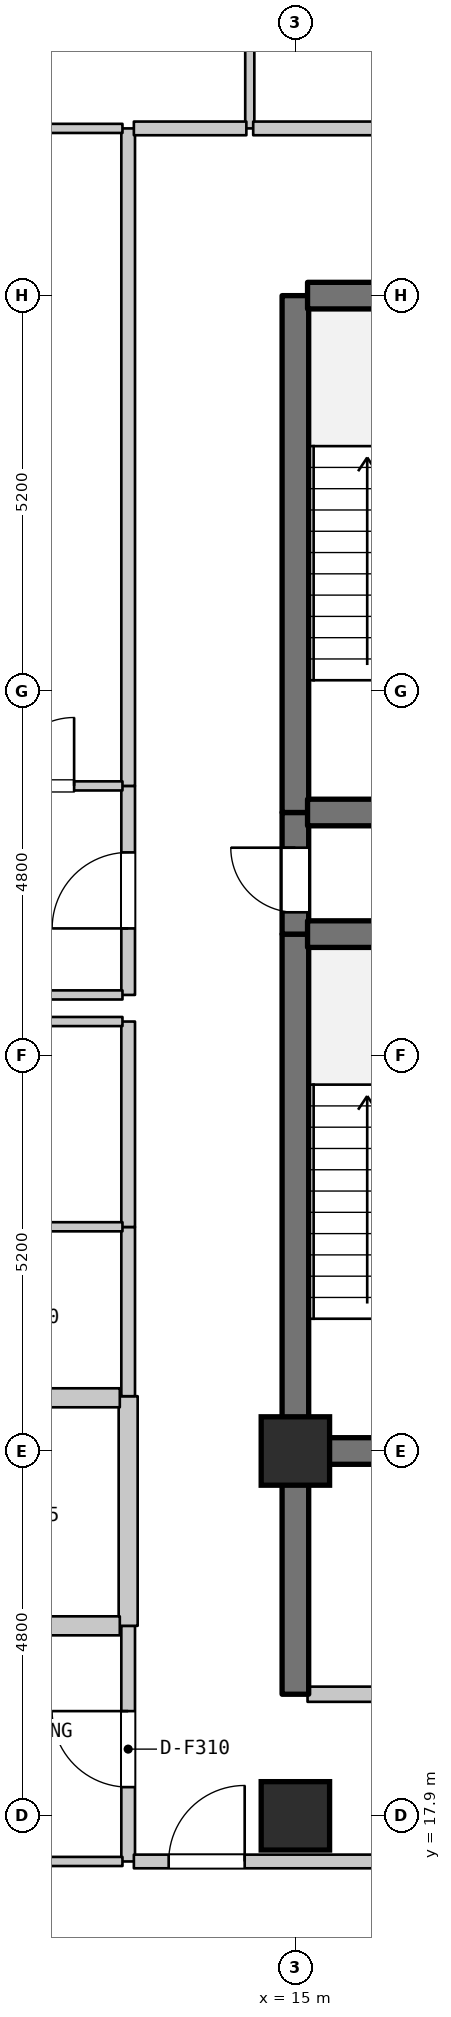
"""IFC4 building model, lengths in metres.
Left out: names, types, materials, properties, quantities, classifications, styles, units other than length and angle.
Written with IfcOpenShell. Run it as: python <this file> out.ifc"""

import sys

from ifc_helpers import new_model, si_unit, direction, frame, frame_2d, origin, origin_2d, place, context, subcontext, project, spatial, rectangle, extrude, element, fill, save


model = new_model("IFC4")
c1 = context("Model", 3, precision=1e-05, world=origin(), true_north=direction((0.0, 1.0)))
c2 = subcontext(c1, "Body", "Model", "MODEL_VIEW")
j1 = project(units=[si_unit("LENGTHUNIT", "METRE"), si_unit("PLANEANGLEUNIT", "RADIAN")], contexts=[c1])
p1 = place(None, origin())
s1 = spatial("IfcSite", under=j1, at=p1, CompositionType="ELEMENT")
p2 = place(p1, origin())
s2 = spatial("IfcBuilding", under=s1, at=p2, CompositionType="ELEMENT")
p3 = place(p2, frame((0.0, 0.0, 164.6)))
s3 = spatial("IfcBuildingStorey", under=s2, at=p3, CompositionType="ELEMENT", Elevation=164.6)
for number, where, z_axis, x_axis in (
    (1, (15.0, 17.9, 0.0), (0.0, 0.0, 1.0), (1.0, 0.0, 0.0)),
    (2, (15.0, 22.7, 0.0), (0.0, 0.0, 1.0), (1.0, 0.0, 0.0)),
):
    element("IfcColumn", number, at=place(p3, frame(where, z_axis=z_axis, x_axis=x_axis)), inside=s3, PredefinedType="COLUMN", context=c2, shape_type="SweptSolid", body=[
        extrude(rectangle(XDim=0.9, YDim=0.9, at=origin_2d()), origin(), (0.0, 0.0, 1.0), 4.5),
    ])
p4 = place(p3, frame((12.8, 17.3, 0.0), z_axis=(0.0, 0.0, 1.0), x_axis=(0.0, 1.0, 0.0)))
e3 = element("IfcWall", 3, at=p4, inside=s3, PredefinedType="STANDARD", context=c2, shape_type="SweptSolid", body=[
    extrude(rectangle(XDim=3.1, YDim=0.18, at=frame_2d((1.55, 0.0))), origin(), (0.0, 0.0, 1.0), 4.19),
])
p5 = place(p4, frame((0.978, 0.0, 0.0)))
e4 = element("IfcOpeningElement", 4, at=p5, cuts=e3, PredefinedType="OPENING", context=c2, shape_type="SweptSolid", body=[
    extrude(rectangle(XDim=1.0, YDim=2.15, at=frame_2d((0.5, 1.075))), frame((0.0, 0.1, 0.0), z_axis=(0.0, -1.0, 0.0), x_axis=(1.0, 0.0, 0.0)), (0.0, 0.0, 1.0), 0.2),
])
p6 = place(p3, frame((12.8, 20.4, 0.0), z_axis=(0.0, 0.0, 1.0), x_axis=(0.0, 1.0, 0.0)))
e5 = element("IfcWall", 5, at=p6, inside=s3, PredefinedType="STANDARD", context=c2, shape_type="SweptSolid", body=[
    extrude(rectangle(XDim=3.021, YDim=0.25, at=frame_2d((1.51, 0.0))), origin(), (0.0, 0.0, 1.0), 4.19),
])
p7 = place(p3, frame((12.8, 23.421, 0.0), z_axis=(0.0, 0.0, 1.0), x_axis=(0.0, 1.0, 0.0)))
e6 = element("IfcWall", 6, at=p7, inside=s3, PredefinedType="STANDARD", context=c2, shape_type="SweptSolid", body=[
    extrude(rectangle(XDim=2.226, YDim=0.18, at=frame_2d((1.113, 0.0))), origin(), (0.0, 0.0, 1.0), 4.19),
])
p8 = place(p3, frame((12.8, 25.647, 0.0), z_axis=(0.0, 0.0, 1.0), x_axis=(0.0, 1.0, 0.0)))
e7 = element("IfcWall", 7, at=p8, inside=s3, PredefinedType="STANDARD", context=c2, shape_type="SweptSolid", body=[
    extrude(rectangle(XDim=2.703, YDim=0.18, at=frame_2d((1.352, 0.0))), origin(), (0.0, 0.0, 1.0), 4.19),
])
p9 = place(p3, frame((12.8, 28.7, 0.0), z_axis=(0.0, 0.0, 1.0), x_axis=(0.0, 1.0, 0.0)))
e8 = element("IfcWall", 8, at=p9, inside=s3, PredefinedType="STANDARD", context=c2, shape_type="SweptSolid", body=[
    extrude(rectangle(XDim=2.75, YDim=0.18, at=frame_2d((1.375, 0.0))), origin(), (0.0, 0.0, 1.0), 4.19),
])
p10 = place(p9, frame((0.875, 0.0, 0.0)))
e9 = element("IfcOpeningElement", 9, at=p10, cuts=e8, PredefinedType="OPENING", context=c2, shape_type="SweptSolid", body=[
    extrude(rectangle(XDim=1.0, YDim=2.15, at=frame_2d((0.5, 1.075))), frame((0.0, 0.1, 0.0), z_axis=(0.0, -1.0, 0.0), x_axis=(1.0, 0.0, 0.0)), (0.0, 0.0, 1.0), 0.2),
])
p11 = place(p3, frame((12.8, 31.45, 0.0), z_axis=(0.0, 0.0, 1.0), x_axis=(0.0, 1.0, 0.0)))
e10 = element("IfcWall", 10, at=p11, inside=s3, PredefinedType="STANDARD", context=c2, shape_type="SweptSolid", body=[
    extrude(rectangle(XDim=8.65, YDim=0.18, at=frame_2d((4.325, 0.0))), origin(), (0.0, 0.0, 1.0), 4.19),
])
p12 = place(p3, frame((14.4, 40.1, 0.0), z_axis=(0.0, 0.0, 1.0), x_axis=(0.0, 1.0, 0.0)))
e11 = element("IfcWall", 11, at=p12, inside=s3, PredefinedType="PARTITIONING", context=c2, shape_type="SweptSolid", body=[
    extrude(rectangle(XDim=2.3, YDim=0.12, at=frame_2d((1.15, 0.0))), origin(), (0.0, 0.0, 1.0), 4.19),
])
p13 = place(p3, frame((15.0, 19.5, 0.0), z_axis=(0.0, 0.0, 1.0), x_axis=(0.0, 1.0, 0.0)))
e12 = element("IfcWall", 12, at=p13, inside=s3, PredefinedType="SHEAR", context=c2, shape_type="SweptSolid", body=[
    extrude(rectangle(XDim=3.2, YDim=0.35, at=frame_2d((1.6, 0.0))), origin(), (0.0, 0.0, 1.0), 4.19),
])
p14 = place(p3, frame((15.0, 22.7, 0.0), z_axis=(0.0, 0.0, 1.0), x_axis=(0.0, 1.0, 0.0)))
e13 = element("IfcWall", 13, at=p14, inside=s3, PredefinedType="SHEAR", context=c2, shape_type="SweptSolid", body=[
    extrude(rectangle(XDim=6.8, YDim=0.35, at=frame_2d((3.4, 0.0))), origin(), (0.0, 0.0, 1.0), 4.19),
])
p15 = place(p3, frame((15.0, 29.5, 0.0), z_axis=(0.0, 0.0, 1.0), x_axis=(0.0, 1.0, 0.0)))
e14 = element("IfcWall", 14, at=p15, inside=s3, PredefinedType="SHEAR", context=c2, shape_type="SweptSolid", body=[
    extrude(rectangle(XDim=1.6, YDim=0.35, at=frame_2d((0.8, 0.0))), origin(), (0.0, 0.0, 1.0), 4.19),
])
p16 = place(p15, frame((0.287, 0.0, 0.0)))
e15 = element("IfcOpeningElement", 15, at=p16, cuts=e14, PredefinedType="OPENING", context=c2, shape_type="SweptSolid", body=[
    extrude(rectangle(XDim=0.85, YDim=2.1, at=frame_2d((0.425, 1.05))), frame((0.0, 0.185, 0.0), z_axis=(0.0, -1.0, 0.0), x_axis=(1.0, 0.0, 0.0)), (0.0, 0.0, 1.0), 0.37),
])
p17 = place(p3, frame((15.0, 31.1, 0.0), z_axis=(0.0, 0.0, 1.0), x_axis=(0.0, 1.0, 0.0)))
e16 = element("IfcWall", 16, at=p17, inside=s3, PredefinedType="SHEAR", context=c2, shape_type="SweptSolid", body=[
    extrude(rectangle(XDim=6.8, YDim=0.35, at=frame_2d((3.4, 0.0))), origin(), (0.0, 0.0, 1.0), 4.19),
])
p18 = place(p3, frame((9.085, 17.3, 0.0), z_axis=(0.0, 0.0, 1.0), x_axis=(1.0, 0.0, 0.0)))
e17 = element("IfcWall", 17, at=p18, inside=s3, PredefinedType="PARTITIONING", context=c2, shape_type="SweptSolid", body=[
    extrude(rectangle(XDim=3.64, YDim=0.12, at=frame_2d((1.82, 0.0))), origin(), (0.0, 0.0, 1.0), 4.19),
])
p19 = place(p3, frame((12.875, 17.3, 0.0), z_axis=(0.0, 0.0, 1.0), x_axis=(1.0, 0.0, 0.0)))
e18 = element("IfcWall", 18, at=p19, inside=s3, PredefinedType="STANDARD", context=c2, shape_type="SweptSolid", body=[
    extrude(rectangle(XDim=3.78, YDim=0.18, at=frame_2d((1.89, 0.0))), origin(), (0.0, 0.0, 1.0), 4.19),
])
p20 = place(p19, frame((0.458, 0.0, 0.0)))
e19 = element("IfcOpeningElement", 19, at=p20, cuts=e18, PredefinedType="OPENING", context=c2, shape_type="SweptSolid", body=[
    extrude(rectangle(XDim=1.0, YDim=2.15, at=frame_2d((0.5, 1.075))), frame((0.0, 0.1, 0.0), z_axis=(0.0, -1.0, 0.0), x_axis=(1.0, 0.0, 0.0)), (0.0, 0.0, 1.0), 0.2),
])
p21 = place(p3, frame((15.16, 19.5, 0.0), z_axis=(0.0, 0.0, 1.0), x_axis=(1.0, 0.0, 0.0)))
e20 = element("IfcWall", 20, at=p21, inside=s3, PredefinedType="STANDARD", context=c2, shape_type="SweptSolid", body=[
    extrude(rectangle(XDim=3.68, YDim=0.2, at=frame_2d((1.84, 0.0))), origin(), (0.0, 0.0, 1.0), 4.19),
])
p22 = place(p21, frame((1.39, 0.0, 0.0)))
e21 = element("IfcOpeningElement", 21, at=p22, cuts=e20, PredefinedType="OPENING", context=c2, shape_type="SweptSolid", body=[
    extrude(rectangle(XDim=0.9, YDim=2.15, at=frame_2d((0.45, 1.075))), frame((0.0, 0.11, 0.0), z_axis=(0.0, -1.0, 0.0), x_axis=(1.0, 0.0, 0.0)), (0.0, 0.0, 1.0), 0.22),
])
p23 = place(p3, frame((10.66, 20.4, 0.0), z_axis=(0.0, 0.0, 1.0), x_axis=(1.0, 0.0, 0.0)))
e22 = element("IfcWall", 22, at=p23, inside=s3, PredefinedType="STANDARD", context=c2, shape_type="SweptSolid", body=[
    extrude(rectangle(XDim=2.03, YDim=0.25, at=frame_2d((1.015, 0.0))), origin(), (0.0, 0.0, 1.0), 4.19),
])
p24 = place(p3, frame((15.16, 22.7, 0.0), z_axis=(0.0, 0.0, 1.0), x_axis=(1.0, 0.0, 0.0)))
e23 = element("IfcWall", 23, at=p24, inside=s3, PredefinedType="SHEAR", context=c2, shape_type="SweptSolid", body=[
    extrude(rectangle(XDim=3.68, YDim=0.35, at=frame_2d((1.84, 0.0))), origin(), (0.0, 0.0, 1.0), 4.19),
])
p25 = place(p3, frame((10.66, 23.4, 0.0), z_axis=(0.0, 0.0, 1.0), x_axis=(1.0, 0.0, 0.0)))
e24 = element("IfcWall", 24, at=p25, inside=s3, PredefinedType="STANDARD", context=c2, shape_type="SweptSolid", body=[
    extrude(rectangle(XDim=2.03, YDim=0.25, at=frame_2d((1.015, 0.0))), origin(), (0.0, 0.0, 1.0), 4.19),
])
for number, where, z_axis, x_axis in (
    (25, (10.595, 25.65, 0.0), (0.0, 0.0, 1.0), (1.0, 0.0, 0.0)),
    (26, (10.595, 28.35, 0.0), (0.0, 0.0, 1.0), (1.0, 0.0, 0.0)),
):
    element("IfcWall", number, at=place(p3, frame(where, z_axis=z_axis, x_axis=x_axis)), inside=s3, PredefinedType="PARTITIONING", context=c2, shape_type="SweptSolid", body=[
        extrude(rectangle(XDim=2.13, YDim=0.12, at=frame_2d((1.065, 0.0))), origin(), (0.0, 0.0, 1.0), 4.19),
    ])
p26 = place(p3, frame((9.03, 28.7, 0.0), z_axis=(0.0, 0.0, 1.0), x_axis=(1.0, 0.0, 0.0)))
e27 = element("IfcWall", 27, at=p26, inside=s3, PredefinedType="PARTITIONING", context=c2, shape_type="SweptSolid", body=[
    extrude(rectangle(XDim=3.695, YDim=0.12, at=frame_2d((1.848, 0.0))), origin(), (0.0, 0.0, 1.0), 4.19),
])
for number, where, z_axis, x_axis in (
    (28, (15.16, 29.5, 0.0), (0.0, 0.0, 1.0), (1.0, 0.0, 0.0)),
    (29, (15.16, 31.1, 0.0), (0.0, 0.0, 1.0), (1.0, 0.0, 0.0)),
):
    element("IfcWall", number, at=place(p3, frame(where, z_axis=z_axis, x_axis=x_axis)), inside=s3, PredefinedType="SHEAR", context=c2, shape_type="SweptSolid", body=[
        extrude(rectangle(XDim=3.68, YDim=0.35, at=frame_2d((1.84, 0.0))), origin(), (0.0, 0.0, 1.0), 4.19),
    ])
p27 = place(p3, frame((10.523, 31.45, 0.0), z_axis=(0.0, 0.0, 1.0), x_axis=(1.0, 0.0, 0.0)))
e30 = element("IfcWall", 30, at=p27, inside=s3, PredefinedType="PARTITIONING", context=c2, shape_type="SweptSolid", body=[
    extrude(rectangle(XDim=2.202, YDim=0.12, at=frame_2d((1.101, 0.0))), origin(), (0.0, 0.0, 1.0), 4.19),
])
p28 = place(p27, frame((0.666, 0.0, 0.0)))
e31 = element("IfcOpeningElement", 31, at=p28, cuts=e30, PredefinedType="OPENING", context=c2, shape_type="SweptSolid", body=[
    extrude(rectangle(XDim=0.9, YDim=2.1, at=frame_2d((0.45, 1.05))), frame((0.0, 0.07, 0.0), z_axis=(0.0, -1.0, 0.0), x_axis=(1.0, 0.0, 0.0)), (0.0, 0.0, 1.0), 0.14),
])
p29 = place(p3, frame((15.16, 37.9, 0.0), z_axis=(0.0, 0.0, 1.0), x_axis=(1.0, 0.0, 0.0)))
e32 = element("IfcWall", 32, at=p29, inside=s3, PredefinedType="SHEAR", context=c2, shape_type="SweptSolid", body=[
    extrude(rectangle(XDim=3.68, YDim=0.35, at=frame_2d((1.84, 0.0))), origin(), (0.0, 0.0, 1.0), 4.19),
])
p30 = place(p3, frame((10.523, 40.1, 0.0), z_axis=(0.0, 0.0, 1.0), x_axis=(1.0, 0.0, 0.0)))
e33 = element("IfcWall", 33, at=p30, inside=s3, PredefinedType="PARTITIONING", context=c2, shape_type="SweptSolid", body=[
    extrude(rectangle(XDim=2.202, YDim=0.12, at=frame_2d((1.101, 0.0))), origin(), (0.0, 0.0, 1.0), 4.19),
])
p31 = place(p3, frame((12.875, 40.1, 0.0), z_axis=(0.0, 0.0, 1.0), x_axis=(1.0, 0.0, 0.0)))
e34 = element("IfcWall", 34, at=p31, inside=s3, PredefinedType="STANDARD", context=c2, shape_type="SweptSolid", body=[
    extrude(rectangle(XDim=1.48, YDim=0.18, at=frame_2d((0.74, 0.0))), origin(), (0.0, 0.0, 1.0), 4.19),
])
p32 = place(p3, frame((14.445, 40.1, 0.0), z_axis=(0.0, 0.0, 1.0), x_axis=(1.0, 0.0, 0.0)))
e35 = element("IfcWall", 35, at=p32, inside=s3, PredefinedType="STANDARD", context=c2, shape_type="SweptSolid", body=[
    extrude(rectangle(XDim=2.215, YDim=0.18, at=frame_2d((1.107, 0.0))), origin(), (0.0, 0.0, 1.0), 4.19),
])
p33 = place(p5, origin())
e36 = element("IfcDoor", 36, at=p33, inside=s3, OperationType="SINGLE_SWING_RIGHT", PredefinedType="DOOR", context=c2, shape_type="SweptSolid", body=[
    extrude(rectangle(XDim=1.0, YDim=2.15, at=frame_2d((0.5, 1.075))), frame((0.0, 0.025, 0.0), z_axis=(0.0, -1.0, 0.0), x_axis=(1.0, 0.0, 0.0)), (0.0, 0.0, 1.0), 0.05),
])
fill(e4, e36)
p34 = place(p10, origin())
e37 = element("IfcDoor", 37, at=p34, inside=s3, OperationType="SINGLE_SWING_LEFT", PredefinedType="DOOR", context=c2, shape_type="SweptSolid", body=[
    extrude(rectangle(XDim=1.0, YDim=2.15, at=frame_2d((0.5, 1.075))), frame((0.0, 0.025, 0.0), z_axis=(0.0, -1.0, 0.0), x_axis=(1.0, 0.0, 0.0)), (0.0, 0.0, 1.0), 0.05),
])
fill(e9, e37)
p35 = place(p16, origin())
e38 = element("IfcDoor", 38, at=p35, inside=s3, OperationType="SINGLE_SWING_RIGHT", PredefinedType="DOOR", context=c2, shape_type="SweptSolid", body=[
    extrude(rectangle(XDim=0.85, YDim=2.1, at=frame_2d((0.425, 1.05))), frame((0.0, 0.025, 0.0), z_axis=(0.0, -1.0, 0.0), x_axis=(1.0, 0.0, 0.0)), (0.0, 0.0, 1.0), 0.05),
])
fill(e15, e38)
p36 = place(p20, origin())
e39 = element("IfcDoor", 39, at=p36, inside=s3, OperationType="SINGLE_SWING_RIGHT", PredefinedType="DOOR", context=c2, shape_type="SweptSolid", body=[
    extrude(rectangle(XDim=1.0, YDim=2.15, at=frame_2d((0.5, 1.075))), frame((0.0, 0.025, 0.0), z_axis=(0.0, -1.0, 0.0), x_axis=(1.0, 0.0, 0.0)), (0.0, 0.0, 1.0), 0.05),
])
fill(e19, e39)
p37 = place(p28, origin())
e40 = element("IfcDoor", 40, at=p37, inside=s3, OperationType="SINGLE_SWING_RIGHT", PredefinedType="DOOR", context=c2, shape_type="SweptSolid", body=[
    extrude(rectangle(XDim=0.9, YDim=2.1, at=frame_2d((0.45, 1.05))), frame((0.0, 0.025, 0.0), z_axis=(0.0, -1.0, 0.0), x_axis=(1.0, 0.0, 0.0)), (0.0, 0.0, 1.0), 0.05),
])
fill(e31, e40)
save(model, sys.argv[1])
